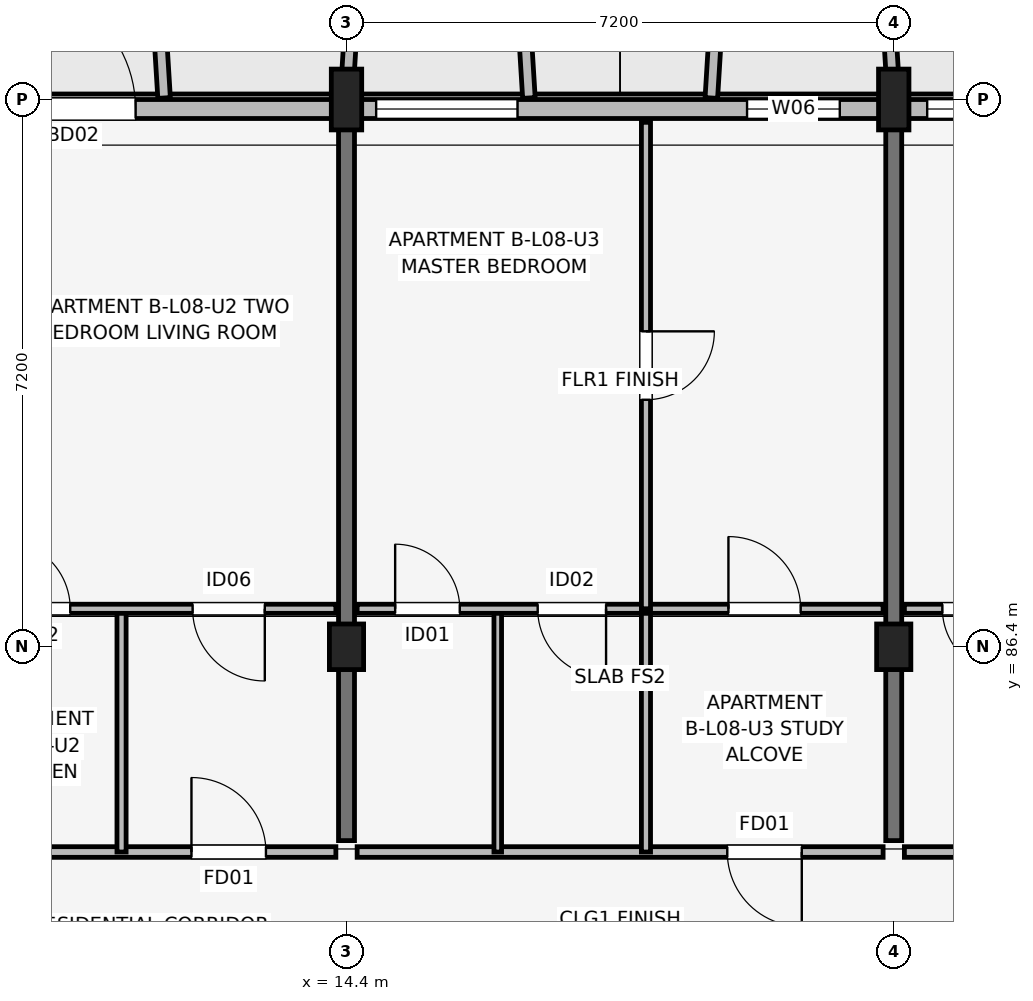
"""IFC4 building model, lengths in metres.
Left out: names, types, materials, properties, quantities, classifications, styles, units other than length and angle.
Written with IfcOpenShell. Run it as: python <this file> out.ifc"""

import sys

from ifc_helpers import new_model, si_unit, direction, frame, frame_2d, origin, origin_2d, place, context, subcontext, project, spatial, rectangle, extrude, element, fill, save


model = new_model("IFC4")
c1 = context("Model", 3, precision=1e-05, world=origin(), true_north=direction((0.0, 1.0)))
c2 = subcontext(c1, "Body", "Model", "MODEL_VIEW")
j1 = project(units=[si_unit("LENGTHUNIT", "METRE"), si_unit("PLANEANGLEUNIT", "RADIAN")], contexts=[c1])
p1 = place(None, origin())
s1 = spatial("IfcSite", under=j1, at=p1, CompositionType="ELEMENT")
p2 = place(p1, origin())
s2 = spatial("IfcBuilding", under=s1, at=p2, CompositionType="ELEMENT")
p3 = place(p2, frame((0.0, 0.0, 27.6)))
s3 = spatial("IfcBuildingStorey", under=s2, at=p3, CompositionType="ELEMENT", Elevation=27.6)
p4 = place(p3, frame((14.4, 86.4, 0.0), z_axis=(0.0, 0.0, 1.0), x_axis=(1.0, 0.0, 0.0)))
e1 = element("IfcColumn", 1, at=p4, inside=s3, PredefinedType="COLUMN", context=c2, shape_type="SweptSolid", body=[
    extrude(rectangle(XDim=0.45, YDim=0.6, at=origin_2d()), origin(), (0.0, 0.0, 1.0), 3.15),
])
p5 = place(p3, frame((14.4, 93.6, 0.0), z_axis=(0.0, 0.0, 1.0), x_axis=(1.0, 0.0, 0.0)))
e2 = element("IfcColumn", 2, at=p5, inside=s3, PredefinedType="COLUMN", context=c2, shape_type="SweptSolid", body=[
    extrude(rectangle(XDim=0.4, YDim=0.8, at=origin_2d()), origin(), (0.0, 0.0, 1.0), 3.15),
])
p6 = place(p3, frame((21.6, 86.4, 0.0), z_axis=(0.0, 0.0, 1.0), x_axis=(1.0, 0.0, 0.0)))
e3 = element("IfcColumn", 3, at=p6, inside=s3, PredefinedType="COLUMN", context=c2, shape_type="SweptSolid", body=[
    extrude(rectangle(XDim=0.45, YDim=0.6, at=origin_2d()), origin(), (0.0, 0.0, 1.0), 3.15),
])
p7 = place(p3, frame((21.6, 93.6, 0.0), z_axis=(0.0, 0.0, 1.0), x_axis=(1.0, 0.0, 0.0)))
e4 = element("IfcColumn", 4, at=p7, inside=s3, PredefinedType="COLUMN", context=c2, shape_type="SweptSolid", body=[
    extrude(rectangle(XDim=0.4, YDim=0.8, at=origin_2d()), origin(), (0.0, 0.0, 1.0), 3.15),
])
for number, where, z_axis, x_axis in (
    (5, (14.4, 83.85, 0.0), (0.0, 0.0, 1.0), (0.0, 1.0, 0.0)),
    (6, (21.6, 83.85, 0.0), (0.0, 0.0, 1.0), (0.0, 1.0, 0.0)),
):
    element("IfcWall", number, at=place(p3, frame(where, z_axis=z_axis, x_axis=x_axis)), inside=s3, PredefinedType="SHEAR", context=c2, shape_type="SweptSolid", body=[
        extrude(rectangle(XDim=9.4, YDim=0.21, at=frame_2d((4.7, 0.0))), origin(), (0.0, 0.0, 1.0), 3.15),
    ])
p8 = place(p3, frame((32.8, 93.475, 0.0), z_axis=(0.0, 0.0, 1.0), x_axis=(-1.0, 0.0, 0.0)))
e7 = element("IfcWall", 7, at=p8, inside=s3, PredefinedType="SOLIDWALL", context=c2, shape_type="SweptSolid", body=[
    extrude(rectangle(XDim=29.6, YDim=0.25, at=frame_2d((14.8, 0.0))), origin(), (0.0, 0.0, 1.0), 2.43),
])
p9 = place(p8, frame((22.825, 0.0, 0.0), z_axis=(0.0, 0.0, 1.0), x_axis=(-1.0, 0.0, 0.0)))
e8 = element("IfcOpeningElement", 8, at=p9, cuts=e7, PredefinedType="OPENING", context=c2, shape_type="SweptSolid", body=[
    extrude(rectangle(XDim=1.65, YDim=2.15, at=frame_2d((0.825, 1.075))), frame((0.0, 0.135, 0.0), z_axis=(0.0, -1.0, 0.0), x_axis=(1.0, 0.0, 0.0)), (0.0, 0.0, 1.0), 0.27),
])
p10 = place(p8, frame((8.35, 0.0, 0.0), z_axis=(0.0, 0.0, 1.0), x_axis=(-1.0, 0.0, 0.0)))
e9 = element("IfcOpeningElement", 9, at=p10, cuts=e7, PredefinedType="OPENING", context=c2, shape_type="SweptSolid", body=[
    extrude(rectangle(XDim=1.5, YDim=2.15, at=frame_2d((0.75, 1.075))), frame((0.0, 0.135, 0.0), z_axis=(0.0, -1.0, 0.0), x_axis=(1.0, 0.0, 0.0)), (0.0, 0.0, 1.0), 0.27),
])
p11 = place(p8, frame((25.99, 0.0, 0.7)))
e10 = element("IfcOpeningElement", 10, at=p11, cuts=e7, PredefinedType="OPENING", context=c2, shape_type="SweptSolid", body=[
    extrude(rectangle(XDim=1.86, YDim=1.6, at=frame_2d((0.93, 0.8))), frame((0.0, 0.135, 0.0), z_axis=(0.0, -1.0, 0.0), x_axis=(1.0, 0.0, 0.0)), (0.0, 0.0, 1.0), 0.27),
])
p12 = place(p8, frame((24.0, 0.0, 0.75)))
e11 = element("IfcOpeningElement", 11, at=p12, cuts=e7, PredefinedType="OPENING", context=c2, shape_type="SweptSolid", body=[
    extrude(rectangle(XDim=0.98, YDim=1.45, at=frame_2d((0.49, 0.725))), frame((0.0, 0.135, 0.0), z_axis=(0.0, -1.0, 0.0), x_axis=(1.0, 0.0, 0.0)), (0.0, 0.0, 1.0), 0.27),
])
p13 = place(p8, frame((16.15, 0.0, 0.7)))
e12 = element("IfcOpeningElement", 12, at=p13, cuts=e7, PredefinedType="OPENING", context=c2, shape_type="SweptSolid", body=[
    extrude(rectangle(XDim=1.86, YDim=1.6, at=frame_2d((0.93, 0.8))), frame((0.0, 0.135, 0.0), z_axis=(0.0, -1.0, 0.0), x_axis=(1.0, 0.0, 0.0)), (0.0, 0.0, 1.0), 0.27),
])
p14 = place(p8, frame((11.91, 0.0, 0.75)))
e13 = element("IfcOpeningElement", 13, at=p14, cuts=e7, PredefinedType="OPENING", context=c2, shape_type="SweptSolid", body=[
    extrude(rectangle(XDim=1.22, YDim=1.5, at=frame_2d((0.61, 0.75))), frame((0.0, 0.135, 0.0), z_axis=(0.0, -1.0, 0.0), x_axis=(1.0, 0.0, 0.0)), (0.0, 0.0, 1.0), 0.27),
])
p15 = place(p8, frame((9.42, 0.0, 0.75)))
e14 = element("IfcOpeningElement", 14, at=p15, cuts=e7, PredefinedType="OPENING", context=c2, shape_type="SweptSolid", body=[
    extrude(rectangle(XDim=1.34, YDim=1.55, at=frame_2d((0.67, 0.775))), frame((0.0, 0.135, 0.0), z_axis=(0.0, -1.0, 0.0), x_axis=(1.0, 0.0, 0.0)), (0.0, 0.0, 1.0), 0.27),
])
p16 = place(p8, frame((2.16, 0.0, 0.75)))
e15 = element("IfcOpeningElement", 15, at=p16, cuts=e7, PredefinedType="OPENING", context=c2, shape_type="SweptSolid", body=[
    extrude(rectangle(XDim=1.46, YDim=1.55, at=frame_2d((0.73, 0.775))), frame((0.0, 0.135, 0.0), z_axis=(0.0, -1.0, 0.0), x_axis=(1.0, 0.0, 0.0)), (0.0, 0.0, 1.0), 0.27),
])
p17 = place(p8, frame((0.585, 0.0, 0.75)))
e16 = element("IfcOpeningElement", 16, at=p17, cuts=e7, PredefinedType="OPENING", context=c2, shape_type="SweptSolid", body=[
    extrude(rectangle(XDim=0.6, YDim=1.25, at=frame_2d((0.3, 0.625))), frame((0.0, 0.135, 0.0), z_axis=(0.0, -1.0, 0.0), x_axis=(1.0, 0.0, 0.0)), (0.0, 0.0, 1.0), 0.27),
])
p18 = place(p3, frame((12.0, 93.62, 0.0), z_axis=(0.0, 0.0, 1.0), x_axis=(-0.061170732449, 0.998127317276, 0.0)))
e17 = element("IfcWall", 17, at=p18, inside=s3, PredefinedType="ELEMENTEDWALL", context=c2, shape_type="SweptSolid", body=[
    extrude(rectangle(XDim=1.964, YDim=0.165, at=frame_2d((0.982, 0.0))), origin(), (0.0, 0.0, 1.0), 2.55),
])
for number, where, z_axis, x_axis in (
    (18, (14.4, 93.62, 0.0), (0.0, 0.0, 1.0), (0.061, 0.998, 0.0)),
    (19, (16.8, 93.62, 0.0), (0.0, 0.0, 1.0), (-0.061, 0.998, 0.0)),
    (20, (19.2, 93.62, 0.0), (0.0, 0.0, 1.0), (0.061, 0.998, 0.0)),
    (21, (21.6, 93.62, 0.0), (0.0, 0.0, 1.0), (-0.061, 0.998, 0.0)),
):
    element("IfcWall", number, at=place(p3, frame(where, z_axis=z_axis, x_axis=x_axis)), inside=s3, PredefinedType="ELEMENTEDWALL", context=c2, shape_type="SweptSolid", body=[
        extrude(rectangle(XDim=1.964, YDim=0.165, at=frame_2d((0.982, 0.0))), origin(), (0.0, 0.0, 1.0), 2.58),
    ])
p19 = place(p3, frame((7.34, 83.7, 0.0), z_axis=(0.0, 0.0, 1.0), x_axis=(1.0, 0.0, 0.0)))
e22 = element("IfcWall", 22, at=p19, inside=s3, PredefinedType="PARTITIONING", context=c2, shape_type="SweptSolid", body=[
    extrude(rectangle(XDim=6.92, YDim=0.14, at=frame_2d((3.46, 0.0))), origin(), (0.0, 0.0, 1.0), 2.38),
])
p20 = place(p19, frame((5.02, 0.0, 0.0)))
e23 = element("IfcOpeningElement", 23, at=p20, cuts=e22, PredefinedType="OPENING", context=c2, shape_type="SweptSolid", body=[
    extrude(rectangle(XDim=0.98, YDim=2.1, at=frame_2d((0.49, 1.05))), frame((0.0, 0.08, 0.0), z_axis=(0.0, -1.0, 0.0), x_axis=(1.0, 0.0, 0.0)), (0.0, 0.0, 1.0), 0.16),
])
p21 = place(p3, frame((11.44, 83.7, 0.0), z_axis=(0.0, 0.0, 1.0), x_axis=(0.0, 1.0, 0.0)))
e24 = element("IfcWall", 24, at=p21, inside=s3, PredefinedType="PARTITIONING", context=c2, shape_type="SweptSolid", body=[
    extrude(rectangle(XDim=3.2, YDim=0.12, at=frame_2d((1.6, 0.0))), origin(), (0.0, 0.0, 1.0), 2.38),
])
p22 = place(p3, frame((7.34, 86.9, 0.0), z_axis=(0.0, 0.0, 1.0), x_axis=(1.0, 0.0, 0.0)))
e25 = element("IfcWall", 25, at=p22, inside=s3, PredefinedType="PARTITIONING", context=c2, shape_type="SweptSolid", body=[
    extrude(rectangle(XDim=6.92, YDim=0.12, at=frame_2d((3.46, 0.0))), origin(), (0.0, 0.0, 1.0), 2.38),
])
p23 = place(p22, frame((1.35, 0.0, 0.0), z_axis=(0.0, 0.0, 1.0), x_axis=(-1.0, 0.0, 0.0)))
e26 = element("IfcOpeningElement", 26, at=p23, cuts=e25, PredefinedType="OPENING", context=c2, shape_type="SweptSolid", body=[
    extrude(rectangle(XDim=0.85, YDim=2.08, at=frame_2d((0.425, 1.04))), frame((0.0, 0.07, 0.0), z_axis=(0.0, -1.0, 0.0), x_axis=(1.0, 0.0, 0.0)), (0.0, 0.0, 1.0), 0.14),
])
p24 = place(p22, frame((2.525, 0.0, 0.0)))
e27 = element("IfcOpeningElement", 27, at=p24, cuts=e25, PredefinedType="OPENING", context=c2, shape_type="SweptSolid", body=[
    extrude(rectangle(XDim=0.9, YDim=2.08, at=frame_2d((0.45, 1.04))), frame((0.0, 0.07, 0.0), z_axis=(0.0, -1.0, 0.0), x_axis=(1.0, 0.0, 0.0)), (0.0, 0.0, 1.0), 0.14),
])
p25 = place(p22, frame((5.985, 0.0, 0.0), z_axis=(0.0, 0.0, 1.0), x_axis=(-1.0, 0.0, 0.0)))
e28 = element("IfcOpeningElement", 28, at=p25, cuts=e25, PredefinedType="OPENING", context=c2, shape_type="SweptSolid", body=[
    extrude(rectangle(XDim=0.95, YDim=2.08, at=frame_2d((0.475, 1.04))), frame((0.0, 0.07, 0.0), z_axis=(0.0, -1.0, 0.0), x_axis=(1.0, 0.0, 0.0)), (0.0, 0.0, 1.0), 0.14),
])
p26 = place(p3, frame((14.54, 83.7, 0.0), z_axis=(0.0, 0.0, 1.0), x_axis=(1.0, 0.0, 0.0)))
e29 = element("IfcWall", 29, at=p26, inside=s3, PredefinedType="PARTITIONING", context=c2, shape_type="SweptSolid", body=[
    extrude(rectangle(XDim=6.92, YDim=0.14, at=frame_2d((3.46, 0.0))), origin(), (0.0, 0.0, 1.0), 2.38),
])
p27 = place(p26, frame((5.85, 0.0, 0.0), z_axis=(0.0, 0.0, 1.0), x_axis=(-1.0, 0.0, 0.0)))
e30 = element("IfcOpeningElement", 30, at=p27, cuts=e29, PredefinedType="OPENING", context=c2, shape_type="SweptSolid", body=[
    extrude(rectangle(XDim=0.98, YDim=2.1, at=frame_2d((0.49, 1.05))), frame((0.0, 0.08, 0.0), z_axis=(0.0, -1.0, 0.0), x_axis=(1.0, 0.0, 0.0)), (0.0, 0.0, 1.0), 0.16),
])
p28 = place(p3, frame((16.39, 83.7, 0.0), z_axis=(0.0, 0.0, 1.0), x_axis=(0.0, 1.0, 0.0)))
e31 = element("IfcWall", 31, at=p28, inside=s3, PredefinedType="PARTITIONING", context=c2, shape_type="SweptSolid", body=[
    extrude(rectangle(XDim=3.2, YDim=0.1, at=frame_2d((1.6, 0.0))), origin(), (0.0, 0.0, 1.0), 2.38),
])
p29 = place(p3, frame((18.34, 83.7, 0.0), z_axis=(0.0, 0.0, 1.0), x_axis=(0.0, 1.0, 0.0)))
e32 = element("IfcWall", 32, at=p29, inside=s3, PredefinedType="PARTITIONING", context=c2, shape_type="SweptSolid", body=[
    extrude(rectangle(XDim=3.2, YDim=0.12, at=frame_2d((1.6, 0.0))), origin(), (0.0, 0.0, 1.0), 2.38),
])
p30 = place(p3, frame((14.54, 86.9, 0.0), z_axis=(0.0, 0.0, 1.0), x_axis=(1.0, 0.0, 0.0)))
e33 = element("IfcWall", 33, at=p30, inside=s3, PredefinedType="PARTITIONING", context=c2, shape_type="SweptSolid", body=[
    extrude(rectangle(XDim=6.92, YDim=0.12, at=frame_2d((3.46, 0.0))), origin(), (0.0, 0.0, 1.0), 2.38),
])
p31 = place(p30, frame((0.5, 0.0, 0.0)))
e34 = element("IfcOpeningElement", 34, at=p31, cuts=e33, PredefinedType="OPENING", context=c2, shape_type="SweptSolid", body=[
    extrude(rectangle(XDim=0.85, YDim=2.08, at=frame_2d((0.425, 1.04))), frame((0.0, 0.07, 0.0), z_axis=(0.0, -1.0, 0.0), x_axis=(1.0, 0.0, 0.0)), (0.0, 0.0, 1.0), 0.14),
])
p32 = place(p30, frame((3.275, 0.0, 0.0), z_axis=(0.0, 0.0, 1.0), x_axis=(-1.0, 0.0, 0.0)))
e35 = element("IfcOpeningElement", 35, at=p32, cuts=e33, PredefinedType="OPENING", context=c2, shape_type="SweptSolid", body=[
    extrude(rectangle(XDim=0.9, YDim=2.08, at=frame_2d((0.45, 1.04))), frame((0.0, 0.07, 0.0), z_axis=(0.0, -1.0, 0.0), x_axis=(1.0, 0.0, 0.0)), (0.0, 0.0, 1.0), 0.14),
])
p33 = place(p30, frame((4.885, 0.0, 0.0)))
e36 = element("IfcOpeningElement", 36, at=p33, cuts=e33, PredefinedType="OPENING", context=c2, shape_type="SweptSolid", body=[
    extrude(rectangle(XDim=0.95, YDim=2.08, at=frame_2d((0.475, 1.04))), frame((0.0, 0.07, 0.0), z_axis=(0.0, -1.0, 0.0), x_axis=(1.0, 0.0, 0.0)), (0.0, 0.0, 1.0), 0.14),
])
p34 = place(p3, frame((18.34, 86.9, 0.0), z_axis=(0.0, 0.0, 1.0), x_axis=(0.0, 1.0, 0.0)))
e37 = element("IfcWall", 37, at=p34, inside=s3, PredefinedType="PARTITIONING", context=c2, shape_type="SweptSolid", body=[
    extrude(rectangle(XDim=6.4, YDim=0.12, at=frame_2d((3.2, 0.0))), origin(), (0.0, 0.0, 1.0), 2.38),
])
p35 = place(p34, frame((3.65, 0.0, 0.0), z_axis=(0.0, 0.0, 1.0), x_axis=(-1.0, 0.0, 0.0)))
e38 = element("IfcOpeningElement", 38, at=p35, cuts=e37, PredefinedType="OPENING", context=c2, shape_type="SweptSolid", body=[
    extrude(rectangle(XDim=0.9, YDim=2.08, at=frame_2d((0.45, 1.04))), frame((0.0, 0.07, 0.0), z_axis=(0.0, -1.0, 0.0), x_axis=(1.0, 0.0, 0.0)), (0.0, 0.0, 1.0), 0.14),
])
p36 = place(p3, frame((21.74, 83.7, 0.0), z_axis=(0.0, 0.0, 1.0), x_axis=(1.0, 0.0, 0.0)))
e39 = element("IfcWall", 39, at=p36, inside=s3, PredefinedType="PARTITIONING", context=c2, shape_type="SweptSolid", body=[
    extrude(rectangle(XDim=6.92, YDim=0.14, at=frame_2d((3.46, 0.0))), origin(), (0.0, 0.0, 1.0), 2.38),
])
p37 = place(p36, frame((5.02, 0.0, 0.0)))
e40 = element("IfcOpeningElement", 40, at=p37, cuts=e39, PredefinedType="OPENING", context=c2, shape_type="SweptSolid", body=[
    extrude(rectangle(XDim=0.98, YDim=2.1, at=frame_2d((0.49, 1.05))), frame((0.0, 0.08, 0.0), z_axis=(0.0, -1.0, 0.0), x_axis=(1.0, 0.0, 0.0)), (0.0, 0.0, 1.0), 0.16),
])
p38 = place(p3, frame((21.74, 86.9, 0.0), z_axis=(0.0, 0.0, 1.0), x_axis=(1.0, 0.0, 0.0)))
e41 = element("IfcWall", 41, at=p38, inside=s3, PredefinedType="PARTITIONING", context=c2, shape_type="SweptSolid", body=[
    extrude(rectangle(XDim=6.92, YDim=0.12, at=frame_2d((3.46, 0.0))), origin(), (0.0, 0.0, 1.0), 2.38),
])
p39 = place(p38, frame((1.35, 0.0, 0.0), z_axis=(0.0, 0.0, 1.0), x_axis=(-1.0, 0.0, 0.0)))
e42 = element("IfcOpeningElement", 42, at=p39, cuts=e41, PredefinedType="OPENING", context=c2, shape_type="SweptSolid", body=[
    extrude(rectangle(XDim=0.85, YDim=2.08, at=frame_2d((0.425, 1.04))), frame((0.0, 0.07, 0.0), z_axis=(0.0, -1.0, 0.0), x_axis=(1.0, 0.0, 0.0)), (0.0, 0.0, 1.0), 0.14),
])
p40 = place(p38, frame((2.525, 0.0, 0.0)))
e43 = element("IfcOpeningElement", 43, at=p40, cuts=e41, PredefinedType="OPENING", context=c2, shape_type="SweptSolid", body=[
    extrude(rectangle(XDim=0.9, YDim=2.08, at=frame_2d((0.45, 1.04))), frame((0.0, 0.07, 0.0), z_axis=(0.0, -1.0, 0.0), x_axis=(1.0, 0.0, 0.0)), (0.0, 0.0, 1.0), 0.14),
])
p41 = place(p38, frame((5.985, 0.0, 0.0), z_axis=(0.0, 0.0, 1.0), x_axis=(-1.0, 0.0, 0.0)))
e44 = element("IfcOpeningElement", 44, at=p41, cuts=e41, PredefinedType="OPENING", context=c2, shape_type="SweptSolid", body=[
    extrude(rectangle(XDim=0.95, YDim=2.08, at=frame_2d((0.475, 1.04))), frame((0.0, 0.07, 0.0), z_axis=(0.0, -1.0, 0.0), x_axis=(1.0, 0.0, 0.0)), (0.0, 0.0, 1.0), 0.14),
])
p42 = place(p9, origin())
e45 = element("IfcDoor", 45, at=p42, inside=s3, OperationType="SINGLE_SWING_RIGHT", PredefinedType="DOOR", context=c2, shape_type="SweptSolid", body=[
    extrude(rectangle(XDim=1.65, YDim=2.15, at=frame_2d((0.825, 1.075))), frame((0.0, 0.025, 0.0), z_axis=(0.0, -1.0, 0.0), x_axis=(1.0, 0.0, 0.0)), (0.0, 0.0, 1.0), 0.05),
])
fill(e8, e45)
p43 = place(p13, origin())
e46 = element("IfcWindow", 46, at=p43, inside=s3, PartitioningType="SINGLE_PANEL", PredefinedType="WINDOW", context=c2, shape_type="SweptSolid", body=[
    extrude(rectangle(XDim=1.86, YDim=1.6, at=frame_2d((0.93, 0.8))), frame((0.0, 0.03, 0.0), z_axis=(0.0, -1.0, 0.0), x_axis=(1.0, 0.0, 0.0)), (0.0, 0.0, 1.0), 0.06),
])
fill(e12, e46)
p44 = place(p14, origin())
e47 = element("IfcWindow", 47, at=p44, inside=s3, PartitioningType="SINGLE_PANEL", PredefinedType="WINDOW", context=c2, shape_type="SweptSolid", body=[
    extrude(rectangle(XDim=1.22, YDim=1.5, at=frame_2d((0.61, 0.75))), frame((0.0, 0.03, 0.0), z_axis=(0.0, -1.0, 0.0), x_axis=(1.0, 0.0, 0.0)), (0.0, 0.0, 1.0), 0.06),
])
fill(e13, e47)
p45 = place(p15, origin())
e48 = element("IfcWindow", 48, at=p45, inside=s3, PartitioningType="SINGLE_PANEL", PredefinedType="WINDOW", context=c2, shape_type="SweptSolid", body=[
    extrude(rectangle(XDim=1.34, YDim=1.55, at=frame_2d((0.67, 0.775))), frame((0.0, 0.03, 0.0), z_axis=(0.0, -1.0, 0.0), x_axis=(1.0, 0.0, 0.0)), (0.0, 0.0, 1.0), 0.06),
])
fill(e14, e48)
p46 = place(p20, origin())
e49 = element("IfcDoor", 49, at=p46, inside=s3, OperationType="SINGLE_SWING_LEFT", PredefinedType="DOOR", context=c2, shape_type="SweptSolid", body=[
    extrude(rectangle(XDim=0.98, YDim=2.1, at=frame_2d((0.49, 1.05))), frame((0.0, 0.025, 0.0), z_axis=(0.0, -1.0, 0.0), x_axis=(1.0, 0.0, 0.0)), (0.0, 0.0, 1.0), 0.05),
])
fill(e23, e49)
p47 = place(p24, origin())
e50 = element("IfcDoor", 50, at=p47, inside=s3, OperationType="SINGLE_SWING_LEFT", PredefinedType="DOOR", context=c2, shape_type="SweptSolid", body=[
    extrude(rectangle(XDim=0.9, YDim=2.08, at=frame_2d((0.45, 1.04))), frame((0.0, 0.025, 0.0), z_axis=(0.0, -1.0, 0.0), x_axis=(1.0, 0.0, 0.0)), (0.0, 0.0, 1.0), 0.05),
])
fill(e27, e50)
p48 = place(p25, origin())
e51 = element("IfcDoor", 51, at=p48, inside=s3, OperationType="SINGLE_SWING_RIGHT", PredefinedType="DOOR", context=c2, shape_type="SweptSolid", body=[
    extrude(rectangle(XDim=0.95, YDim=2.08, at=frame_2d((0.475, 1.04))), frame((0.0, 0.025, 0.0), z_axis=(0.0, -1.0, 0.0), x_axis=(1.0, 0.0, 0.0)), (0.0, 0.0, 1.0), 0.05),
])
fill(e28, e51)
p49 = place(p27, origin())
e52 = element("IfcDoor", 52, at=p49, inside=s3, OperationType="SINGLE_SWING_RIGHT", PredefinedType="DOOR", context=c2, shape_type="SweptSolid", body=[
    extrude(rectangle(XDim=0.98, YDim=2.1, at=frame_2d((0.49, 1.05))), frame((0.0, 0.025, 0.0), z_axis=(0.0, -1.0, 0.0), x_axis=(1.0, 0.0, 0.0)), (0.0, 0.0, 1.0), 0.05),
])
fill(e30, e52)
p50 = place(p31, origin())
e53 = element("IfcDoor", 53, at=p50, inside=s3, OperationType="SINGLE_SWING_LEFT", PredefinedType="DOOR", context=c2, shape_type="SweptSolid", body=[
    extrude(rectangle(XDim=0.85, YDim=2.08, at=frame_2d((0.425, 1.04))), frame((0.0, 0.025, 0.0), z_axis=(0.0, -1.0, 0.0), x_axis=(1.0, 0.0, 0.0)), (0.0, 0.0, 1.0), 0.05),
])
fill(e34, e53)
p51 = place(p32, origin())
e54 = element("IfcDoor", 54, at=p51, inside=s3, OperationType="SINGLE_SWING_RIGHT", PredefinedType="DOOR", context=c2, shape_type="SweptSolid", body=[
    extrude(rectangle(XDim=0.9, YDim=2.08, at=frame_2d((0.45, 1.04))), frame((0.0, 0.025, 0.0), z_axis=(0.0, -1.0, 0.0), x_axis=(1.0, 0.0, 0.0)), (0.0, 0.0, 1.0), 0.05),
])
fill(e35, e54)
p52 = place(p33, origin())
e55 = element("IfcDoor", 55, at=p52, inside=s3, OperationType="SINGLE_SWING_LEFT", PredefinedType="DOOR", context=c2, shape_type="SweptSolid", body=[
    extrude(rectangle(XDim=0.95, YDim=2.08, at=frame_2d((0.475, 1.04))), frame((0.0, 0.025, 0.0), z_axis=(0.0, -1.0, 0.0), x_axis=(1.0, 0.0, 0.0)), (0.0, 0.0, 1.0), 0.05),
])
fill(e36, e55)
p53 = place(p35, origin())
e56 = element("IfcDoor", 56, at=p53, inside=s3, OperationType="SINGLE_SWING_RIGHT", PredefinedType="DOOR", context=c2, shape_type="SweptSolid", body=[
    extrude(rectangle(XDim=0.9, YDim=2.08, at=frame_2d((0.45, 1.04))), frame((0.0, 0.025, 0.0), z_axis=(0.0, -1.0, 0.0), x_axis=(1.0, 0.0, 0.0)), (0.0, 0.0, 1.0), 0.05),
])
fill(e38, e56)
p54 = place(p39, origin())
e57 = element("IfcDoor", 57, at=p54, inside=s3, OperationType="SINGLE_SWING_RIGHT", PredefinedType="DOOR", context=c2, shape_type="SweptSolid", body=[
    extrude(rectangle(XDim=0.85, YDim=2.08, at=frame_2d((0.425, 1.04))), frame((0.0, 0.025, 0.0), z_axis=(0.0, -1.0, 0.0), x_axis=(1.0, 0.0, 0.0)), (0.0, 0.0, 1.0), 0.05),
])
fill(e42, e57)
save(model, sys.argv[1])
